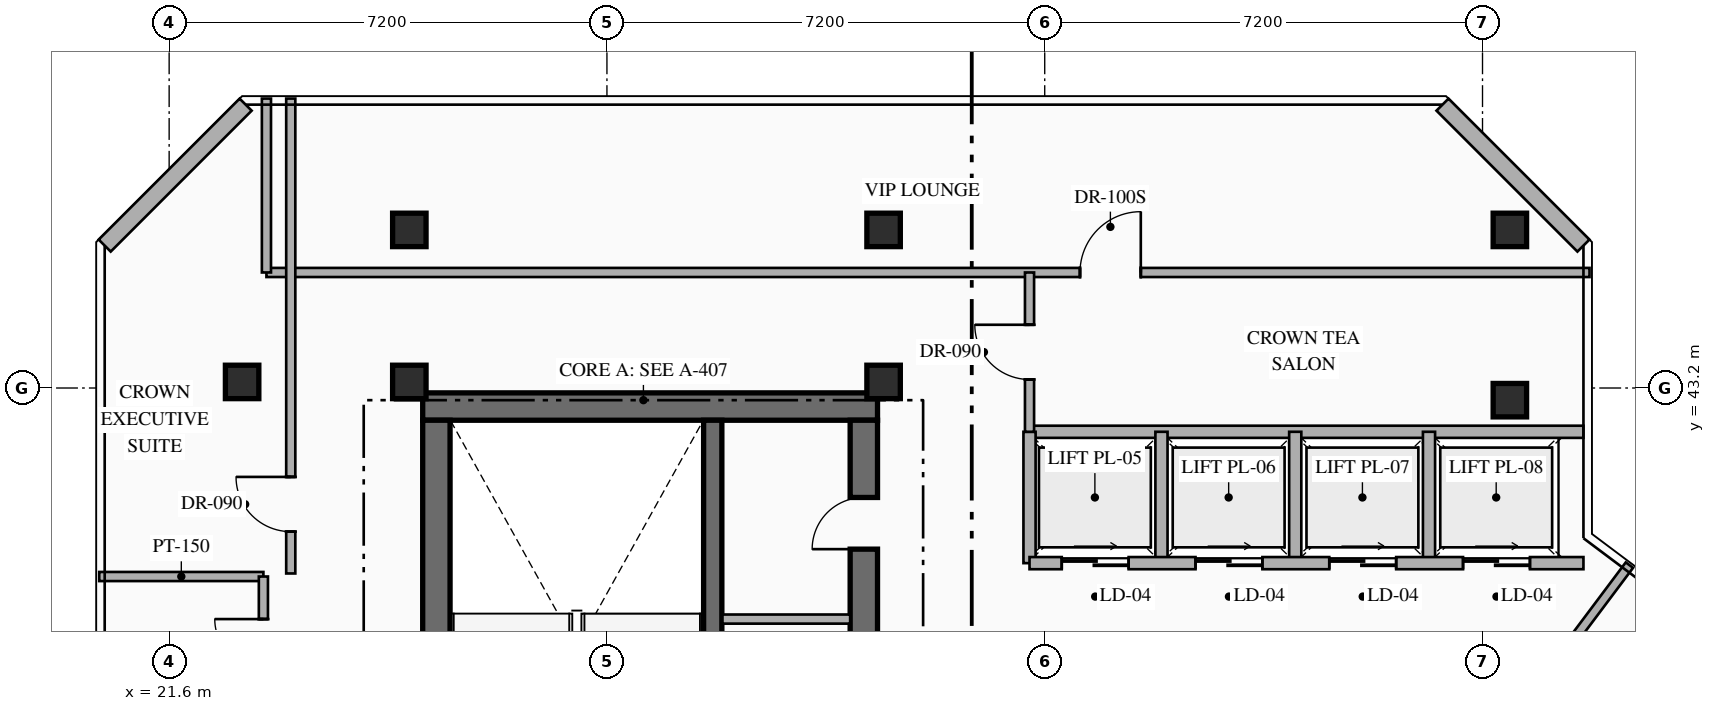
"""IFC4 building model, lengths in metres.
Left out: names, types, materials, properties, quantities, classifications, styles, units other than length and angle.
Written with IfcOpenShell. Run it as: python <this file> out.ifc"""

import sys

from ifc_helpers import new_model, si_unit, direction, frame, frame_2d, origin, origin_2d, place, context, subcontext, project, spatial, rectangle, hollow_rectangle, extrude, element, fill, save


model = new_model("IFC4")
c1 = context("Model", 3, precision=1e-05, world=origin(), true_north=direction((0.0, 1.0)))
c2 = subcontext(c1, "Body", "Model", "MODEL_VIEW")
j1 = project(units=[si_unit("LENGTHUNIT", "METRE"), si_unit("PLANEANGLEUNIT", "RADIAN")], contexts=[c1])
p1 = place(None, origin())
s1 = spatial("IfcSite", under=j1, at=p1, CompositionType="ELEMENT")
p2 = place(p1, origin())
s2 = spatial("IfcBuilding", under=s1, at=p2, CompositionType="ELEMENT")
p3 = place(p2, frame((0.0, 0.0, 281.95)))
s3 = spatial("IfcBuildingStorey", under=s2, at=p3, CompositionType="ELEMENT", Elevation=281.95)
p4 = place(p3, frame((25.77, 42.895, 0.0), z_axis=(0.0, 0.0, 1.0), x_axis=(1.0, 0.0, 0.0)))
e1 = element("IfcWall", 1, at=p4, inside=s3, PredefinedType="SHEAR", context=c2, shape_type="SweptSolid", body=[
    extrude(rectangle(XDim=7.48, YDim=0.45, at=frame_2d((3.74, 0.0))), origin(), (0.0, 0.0, 1.0), 4.0),
])
p5 = place(p3, frame((25.995, 33.19, 0.0), z_axis=(0.0, 0.0, 1.0), x_axis=(0.0, 1.0, 0.0)))
e2 = element("IfcWall", 2, at=p5, inside=s3, PredefinedType="SHEAR", context=c2, shape_type="SweptSolid", body=[
    extrude(rectangle(XDim=9.48, YDim=0.45, at=frame_2d((4.74, 0.0))), origin(), (0.0, 0.0, 1.0), 4.0),
])
p6 = place(p3, frame((33.025, 33.19, 0.0), z_axis=(0.0, 0.0, 1.0), x_axis=(0.0, 1.0, 0.0)))
e3 = element("IfcWall", 3, at=p6, inside=s3, PredefinedType="SHEAR", context=c2, shape_type="SweptSolid", body=[
    extrude(rectangle(XDim=9.48, YDim=0.45, at=frame_2d((4.74, 0.0))), origin(), (0.0, 0.0, 1.0), 4.0),
])
p7 = place(p6, frame((4.16, 0.0, 0.0)))
e4 = element("IfcOpeningElement", 4, at=p7, cuts=e3, PredefinedType="OPENING", context=c2, shape_type="SweptSolid", body=[
    extrude(rectangle(XDim=0.85, YDim=2.08, at=frame_2d((0.425, 1.04))), frame((0.0, 0.235, 0.0), z_axis=(0.0, -1.0, 0.0), x_axis=(1.0, 0.0, 0.0)), (0.0, 0.0, 1.0), 0.47),
])
p8 = place(p6, frame((7.36, 0.0, 0.0)))
e5 = element("IfcOpeningElement", 5, at=p8, cuts=e3, PredefinedType="OPENING", context=c2, shape_type="SweptSolid", body=[
    extrude(rectangle(XDim=0.85, YDim=2.08, at=frame_2d((0.425, 1.04))), frame((0.0, 0.235, 0.0), z_axis=(0.0, -1.0, 0.0), x_axis=(1.0, 0.0, 0.0)), (0.0, 0.0, 1.0), 0.47),
])
p9 = place(p3, frame((30.54, 33.19, 0.0), z_axis=(0.0, 0.0, 1.0), x_axis=(0.0, 1.0, 0.0)))
e6 = element("IfcWall", 6, at=p9, inside=s3, PredefinedType="SHEAR", context=c2, shape_type="SweptSolid", body=[
    extrude(rectangle(XDim=9.48, YDim=0.3, at=frame_2d((4.74, 0.0))), origin(), (0.0, 0.0, 1.0), 4.0),
])
for number, where, z_axis, x_axis in (
    (7, (25.55, 43.3, 0.0), (0.0, 0.0, 1.0), (1.0, 0.0, 0.0)),
    (8, (33.35, 43.3, 0.0), (0.0, 0.0, 1.0), (1.0, 0.0, 0.0)),
    (9, (43.65, 43.0, 0.0), (0.0, 0.0, 1.0), (1.0, 0.0, 0.0)),
    (10, (25.55, 45.8, 0.0), (0.0, 0.0, 1.0), (1.0, 0.0, 0.0)),
    (11, (33.35, 45.8, 0.0), (0.0, 0.0, 1.0), (1.0, 0.0, 0.0)),
    (12, (43.65, 45.8, 0.0), (0.0, 0.0, 1.0), (1.0, 0.0, 0.0)),
    (13, (22.8, 43.3, 0.0), (0.0, 0.0, 1.0), (1.0, 0.0, 0.0)),
):
    element("IfcColumn", number, at=place(p3, frame(where, z_axis=z_axis, x_axis=x_axis)), inside=s3, PredefinedType="COLUMN", context=c2, shape_type="SweptSolid", body=[
        extrude(hollow_rectangle(XDim=0.55, YDim=0.55, WallThickness=0.022, at=origin_2d()), origin(), (0.0, 0.0, 1.0), 4.0),
    ])
p10 = place(p3, frame((20.54, 45.542, 0.0), z_axis=(0.0, 0.0, 1.0), x_axis=(0.707069542501, 0.707144017911, 0.0)))
e14 = element("IfcWall", 14, at=p10, inside=s3, PredefinedType="STANDARD", context=c2, shape_type="SweptSolid", body=[
    extrude(rectangle(XDim=3.278, YDim=0.28, at=frame_2d((1.639, 0.0))), origin(), (0.0, 0.0, 1.0), 3.75),
])
p11 = place(p3, frame((42.542, 47.86, 0.0), z_axis=(0.0, 0.0, 1.0), x_axis=(0.707106781187, -0.707106781187, 0.0)))
e15 = element("IfcWall", 15, at=p11, inside=s3, PredefinedType="STANDARD", context=c2, shape_type="SweptSolid", body=[
    extrude(rectangle(XDim=3.278, YDim=0.28, at=frame_2d((1.639, 0.0))), origin(), (0.0, 0.0, 1.0), 3.75),
])
p12 = place(p3, frame((30.7, 39.4, 0.0), z_axis=(0.0, 0.0, 1.0), x_axis=(1.0, 0.0, 0.0)))
e16 = element("IfcWall", 16, at=p12, inside=s3, PredefinedType="PARTITIONING", context=c2, shape_type="SweptSolid", body=[
    extrude(rectangle(XDim=2.1, YDim=0.15, at=frame_2d((1.05, 0.0))), origin(), (0.0, 0.0, 1.0), 3.75),
])
p13 = place(p3, frame((35.75, 42.48, 0.0), z_axis=(0.0, 0.0, 1.0), x_axis=(1.0, 0.0, 0.0)))
e17 = element("IfcWall", 17, at=p13, inside=s3, PredefinedType="STANDARD", context=c2, shape_type="SweptSolid", body=[
    extrude(rectangle(XDim=9.11, YDim=0.2, at=frame_2d((4.555, 0.0))), origin(), (0.0, 0.0, 1.0), 3.75),
])
for number, where, z_axis, x_axis in (
    (18, (35.75, 40.32, 0.0), (0.0, 0.0, 1.0), (0.0, 1.0, 0.0)),
    (19, (37.92, 40.32, 0.0), (0.0, 0.0, 1.0), (0.0, 1.0, 0.0)),
    (20, (40.12, 40.32, 0.0), (0.0, 0.0, 1.0), (0.0, 1.0, 0.0)),
    (21, (42.32, 40.32, 0.0), (0.0, 0.0, 1.0), (0.0, 1.0, 0.0)),
):
    element("IfcWall", number, at=place(p3, frame(where, z_axis=z_axis, x_axis=x_axis)), inside=s3, PredefinedType="STANDARD", context=c2, shape_type="SweptSolid", body=[
        extrude(rectangle(XDim=2.16, YDim=0.2, at=frame_2d((1.08, 0.0))), origin(), (0.0, 0.0, 1.0), 3.75),
    ])
p14 = place(p3, frame((35.75, 40.32, 0.0), z_axis=(0.0, 0.0, 1.0), x_axis=(1.0, 0.0, 0.0)))
e22 = element("IfcWall", 22, at=p14, inside=s3, PredefinedType="STANDARD", context=c2, shape_type="SweptSolid", body=[
    extrude(rectangle(XDim=9.11, YDim=0.2, at=frame_2d((4.555, 0.0))), origin(), (0.0, 0.0, 1.0), 3.75),
])
p15 = place(p14, frame((0.53, 0.0, 0.0)))
e23 = element("IfcOpeningElement", 23, at=p15, cuts=e22, PredefinedType="OPENING", context=c2, shape_type="SweptSolid", body=[
    extrude(rectangle(XDim=1.1, YDim=2.18, at=frame_2d((0.55, 1.09))), frame((0.0, 0.11, 0.0), z_axis=(0.0, -1.0, 0.0), x_axis=(1.0, 0.0, 0.0)), (0.0, 0.0, 1.0), 0.22),
])
p16 = place(p14, frame((2.73, 0.0, 0.0)))
e24 = element("IfcOpeningElement", 24, at=p16, cuts=e22, PredefinedType="OPENING", context=c2, shape_type="SweptSolid", body=[
    extrude(rectangle(XDim=1.1, YDim=2.18, at=frame_2d((0.55, 1.09))), frame((0.0, 0.11, 0.0), z_axis=(0.0, -1.0, 0.0), x_axis=(1.0, 0.0, 0.0)), (0.0, 0.0, 1.0), 0.22),
])
p17 = place(p14, frame((4.93, 0.0, 0.0)))
e25 = element("IfcOpeningElement", 25, at=p17, cuts=e22, PredefinedType="OPENING", context=c2, shape_type="SweptSolid", body=[
    extrude(rectangle(XDim=1.1, YDim=2.18, at=frame_2d((0.55, 1.09))), frame((0.0, 0.11, 0.0), z_axis=(0.0, -1.0, 0.0), x_axis=(1.0, 0.0, 0.0)), (0.0, 0.0, 1.0), 0.22),
])
p18 = place(p14, frame((7.13, 0.0, 0.0)))
e26 = element("IfcOpeningElement", 26, at=p18, cuts=e22, PredefinedType="OPENING", context=c2, shape_type="SweptSolid", body=[
    extrude(rectangle(XDim=1.1, YDim=2.18, at=frame_2d((0.55, 1.09))), frame((0.0, 0.11, 0.0), z_axis=(0.0, -1.0, 0.0), x_axis=(1.0, 0.0, 0.0)), (0.0, 0.0, 1.0), 0.22),
])
p19 = place(p3, frame((20.45, 40.1, 0.0), z_axis=(0.0, 0.0, 1.0), x_axis=(1.0, 0.0, 0.0)))
e27 = element("IfcWall", 27, at=p19, inside=s3, PredefinedType="PARTITIONING", context=c2, shape_type="SweptSolid", body=[
    extrude(rectangle(XDim=2.7, YDim=0.15, at=frame_2d((1.35, 0.0))), origin(), (0.0, 0.0, 1.0), 3.75),
])
p20 = place(p3, frame((23.15, 37.9, 0.0), z_axis=(0.0, 0.0, 1.0), x_axis=(0.0, 1.0, 0.0)))
e28 = element("IfcWall", 28, at=p20, inside=s3, PredefinedType="PARTITIONING", context=c2, shape_type="SweptSolid", body=[
    extrude(rectangle(XDim=2.2, YDim=0.15, at=frame_2d((1.1, 0.0))), origin(), (0.0, 0.0, 1.0), 3.75),
])
p21 = place(p20, frame((0.7, 0.0, 0.0)))
e29 = element("IfcOpeningElement", 29, at=p21, cuts=e28, PredefinedType="OPENING", context=c2, shape_type="SweptSolid", body=[
    extrude(rectangle(XDim=0.8, YDim=2.06, at=frame_2d((0.4, 1.03))), frame((0.0, 0.085, 0.0), z_axis=(0.0, -1.0, 0.0), x_axis=(1.0, 0.0, 0.0)), (0.0, 0.0, 1.0), 0.17),
])
p22 = place(p3, frame((23.2, 45.1, 0.0), z_axis=(0.0, 0.0, 1.0), x_axis=(1.0, 0.0, 0.0)))
e30 = element("IfcWall", 30, at=p22, inside=s3, PredefinedType="PARTITIONING", context=c2, shape_type="SweptSolid", body=[
    extrude(rectangle(XDim=21.76, YDim=0.15, at=frame_2d((10.88, 0.0))), origin(), (0.0, 0.0, 1.0), 3.75),
])
p23 = place(p22, frame((13.38, 0.0, 0.0)))
e31 = element("IfcOpeningElement", 31, at=p23, cuts=e30, PredefinedType="OPENING", context=c2, shape_type="SweptSolid", body=[
    extrude(rectangle(XDim=1.0, YDim=2.15, at=frame_2d((0.5, 1.075))), frame((0.0, 0.085, 0.0), z_axis=(0.0, -1.0, 0.0), x_axis=(1.0, 0.0, 0.0)), (0.0, 0.0, 1.0), 0.17),
])
p24 = place(p3, frame((23.2, 45.1, 0.0), z_axis=(0.0, 0.0, 1.0), x_axis=(0.0, 1.0, 0.0)))
e32 = element("IfcWall", 32, at=p24, inside=s3, PredefinedType="PARTITIONING", context=c2, shape_type="SweptSolid", body=[
    extrude(rectangle(XDim=2.86, YDim=0.15, at=frame_2d((1.43, 0.0))), origin(), (0.0, 0.0, 1.0), 3.75),
])
p25 = place(p3, frame((35.75, 42.48, 0.0), z_axis=(0.0, 0.0, 1.0), x_axis=(0.0, 1.0, 0.0)))
e33 = element("IfcWall", 33, at=p25, inside=s3, PredefinedType="PARTITIONING", context=c2, shape_type="SweptSolid", body=[
    extrude(rectangle(XDim=2.62, YDim=0.15, at=frame_2d((1.31, 0.0))), origin(), (0.0, 0.0, 1.0), 3.75),
])
p26 = place(p25, frame((0.86, 0.0, 0.0)))
e34 = element("IfcOpeningElement", 34, at=p26, cuts=e33, PredefinedType="OPENING", context=c2, shape_type="SweptSolid", body=[
    extrude(rectangle(XDim=0.9, YDim=2.15, at=frame_2d((0.45, 1.075))), frame((0.0, 0.085, 0.0), z_axis=(0.0, -1.0, 0.0), x_axis=(1.0, 0.0, 0.0)), (0.0, 0.0, 1.0), 0.17),
])
p27 = place(p3, frame((23.6, 40.15, 0.0), z_axis=(0.0, 0.0, 1.0), x_axis=(0.0, 1.0, 0.0)))
e35 = element("IfcWall", 35, at=p27, inside=s3, PredefinedType="PARTITIONING", context=c2, shape_type="SweptSolid", body=[
    extrude(rectangle(XDim=7.81, YDim=0.15, at=frame_2d((3.905, 0.0))), origin(), (0.0, 0.0, 1.0), 3.75),
])
p28 = place(p27, frame((0.688, 0.0, 0.0)))
e36 = element("IfcOpeningElement", 36, at=p28, cuts=e35, PredefinedType="OPENING", context=c2, shape_type="SweptSolid", body=[
    extrude(rectangle(XDim=0.9, YDim=2.15, at=frame_2d((0.45, 1.075))), frame((0.0, 0.085, 0.0), z_axis=(0.0, -1.0, 0.0), x_axis=(1.0, 0.0, 0.0)), (0.0, 0.0, 1.0), 0.17),
])
p29 = place(p3, frame((42.94, 36.72, 0.0), z_axis=(0.0, 0.0, 1.0), x_axis=(0.599991241767, 0.8000065686, 0.0)))
e37 = element("IfcWall", 37, at=p29, inside=s3, PredefinedType="PARTITIONING", context=c2, shape_type="SweptSolid", body=[
    extrude(rectangle(XDim=4.46, YDim=0.15, at=frame_2d((2.23, 0.0))), origin(), (0.0, 0.0, 1.0), 3.75),
])
p30 = place(p29, frame((1.947, 0.0, 0.0)))
e38 = element("IfcOpeningElement", 38, at=p30, cuts=e37, PredefinedType="OPENING", context=c2, shape_type="SweptSolid", body=[
    extrude(rectangle(XDim=0.85, YDim=2.08, at=frame_2d((0.425, 1.04))), frame((0.0, 0.085, 0.0), z_axis=(0.0, -1.0, 0.0), x_axis=(1.0, 0.0, 0.0)), (0.0, 0.0, 1.0), 0.17),
])
p31 = place(p8, origin())
e39 = element("IfcDoor", 39, at=p31, inside=s3, OperationType="SINGLE_SWING_LEFT", PredefinedType="DOOR", context=c2, shape_type="SweptSolid", body=[
    extrude(rectangle(XDim=0.85, YDim=2.08, at=frame_2d((0.425, 1.04))), frame((0.0, 0.025, 0.0), z_axis=(0.0, -1.0, 0.0), x_axis=(1.0, 0.0, 0.0)), (0.0, 0.0, 1.0), 0.05),
])
fill(e5, e39)
p32 = place(p15, origin())
e40 = element("IfcDoor", 40, at=p32, inside=s3, OperationType="SLIDING_TO_RIGHT", PredefinedType="USERDEFINED", context=c2, shape_type="SweptSolid", body=[
    extrude(rectangle(XDim=1.1, YDim=2.18, at=frame_2d((0.55, 1.09))), frame((0.0, 0.025, 0.0), z_axis=(0.0, -1.0, 0.0), x_axis=(1.0, 0.0, 0.0)), (0.0, 0.0, 1.0), 0.05),
])
fill(e23, e40)
p33 = place(p16, origin())
e41 = element("IfcDoor", 41, at=p33, inside=s3, OperationType="SLIDING_TO_RIGHT", PredefinedType="USERDEFINED", context=c2, shape_type="SweptSolid", body=[
    extrude(rectangle(XDim=1.1, YDim=2.18, at=frame_2d((0.55, 1.09))), frame((0.0, 0.025, 0.0), z_axis=(0.0, -1.0, 0.0), x_axis=(1.0, 0.0, 0.0)), (0.0, 0.0, 1.0), 0.05),
])
fill(e24, e41)
p34 = place(p17, origin())
e42 = element("IfcDoor", 42, at=p34, inside=s3, OperationType="SLIDING_TO_RIGHT", PredefinedType="USERDEFINED", context=c2, shape_type="SweptSolid", body=[
    extrude(rectangle(XDim=1.1, YDim=2.18, at=frame_2d((0.55, 1.09))), frame((0.0, 0.025, 0.0), z_axis=(0.0, -1.0, 0.0), x_axis=(1.0, 0.0, 0.0)), (0.0, 0.0, 1.0), 0.05),
])
fill(e25, e42)
p35 = place(p18, origin())
e43 = element("IfcDoor", 43, at=p35, inside=s3, OperationType="SLIDING_TO_RIGHT", PredefinedType="USERDEFINED", context=c2, shape_type="SweptSolid", body=[
    extrude(rectangle(XDim=1.1, YDim=2.18, at=frame_2d((0.55, 1.09))), frame((0.0, 0.025, 0.0), z_axis=(0.0, -1.0, 0.0), x_axis=(1.0, 0.0, 0.0)), (0.0, 0.0, 1.0), 0.05),
])
fill(e26, e43)
p36 = place(p21, origin())
e44 = element("IfcDoor", 44, at=p36, inside=s3, OperationType="SINGLE_SWING_RIGHT", PredefinedType="DOOR", context=c2, shape_type="SweptSolid", body=[
    extrude(rectangle(XDim=0.8, YDim=2.06, at=frame_2d((0.4, 1.03))), frame((0.0, 0.025, 0.0), z_axis=(0.0, -1.0, 0.0), x_axis=(1.0, 0.0, 0.0)), (0.0, 0.0, 1.0), 0.05),
])
fill(e29, e44)
p37 = place(p23, origin())
e45 = element("IfcDoor", 45, at=p37, inside=s3, OperationType="SINGLE_SWING_RIGHT", PredefinedType="DOOR", context=c2, shape_type="SweptSolid", body=[
    extrude(rectangle(XDim=1.0, YDim=2.15, at=frame_2d((0.5, 1.075))), frame((0.0, 0.025, 0.0), z_axis=(0.0, -1.0, 0.0), x_axis=(1.0, 0.0, 0.0)), (0.0, 0.0, 1.0), 0.05),
])
fill(e31, e45)
p38 = place(p26, origin())
e46 = element("IfcDoor", 46, at=p38, inside=s3, OperationType="SINGLE_SWING_RIGHT", PredefinedType="DOOR", context=c2, shape_type="SweptSolid", body=[
    extrude(rectangle(XDim=0.9, YDim=2.15, at=frame_2d((0.45, 1.075))), frame((0.0, 0.025, 0.0), z_axis=(0.0, -1.0, 0.0), x_axis=(1.0, 0.0, 0.0)), (0.0, 0.0, 1.0), 0.05),
])
fill(e34, e46)
p39 = place(p28, origin())
e47 = element("IfcDoor", 47, at=p39, inside=s3, OperationType="SINGLE_SWING_RIGHT", PredefinedType="DOOR", context=c2, shape_type="SweptSolid", body=[
    extrude(rectangle(XDim=0.9, YDim=2.15, at=frame_2d((0.45, 1.075))), frame((0.0, 0.025, 0.0), z_axis=(0.0, -1.0, 0.0), x_axis=(1.0, 0.0, 0.0)), (0.0, 0.0, 1.0), 0.05),
])
fill(e36, e47)
save(model, sys.argv[1])
